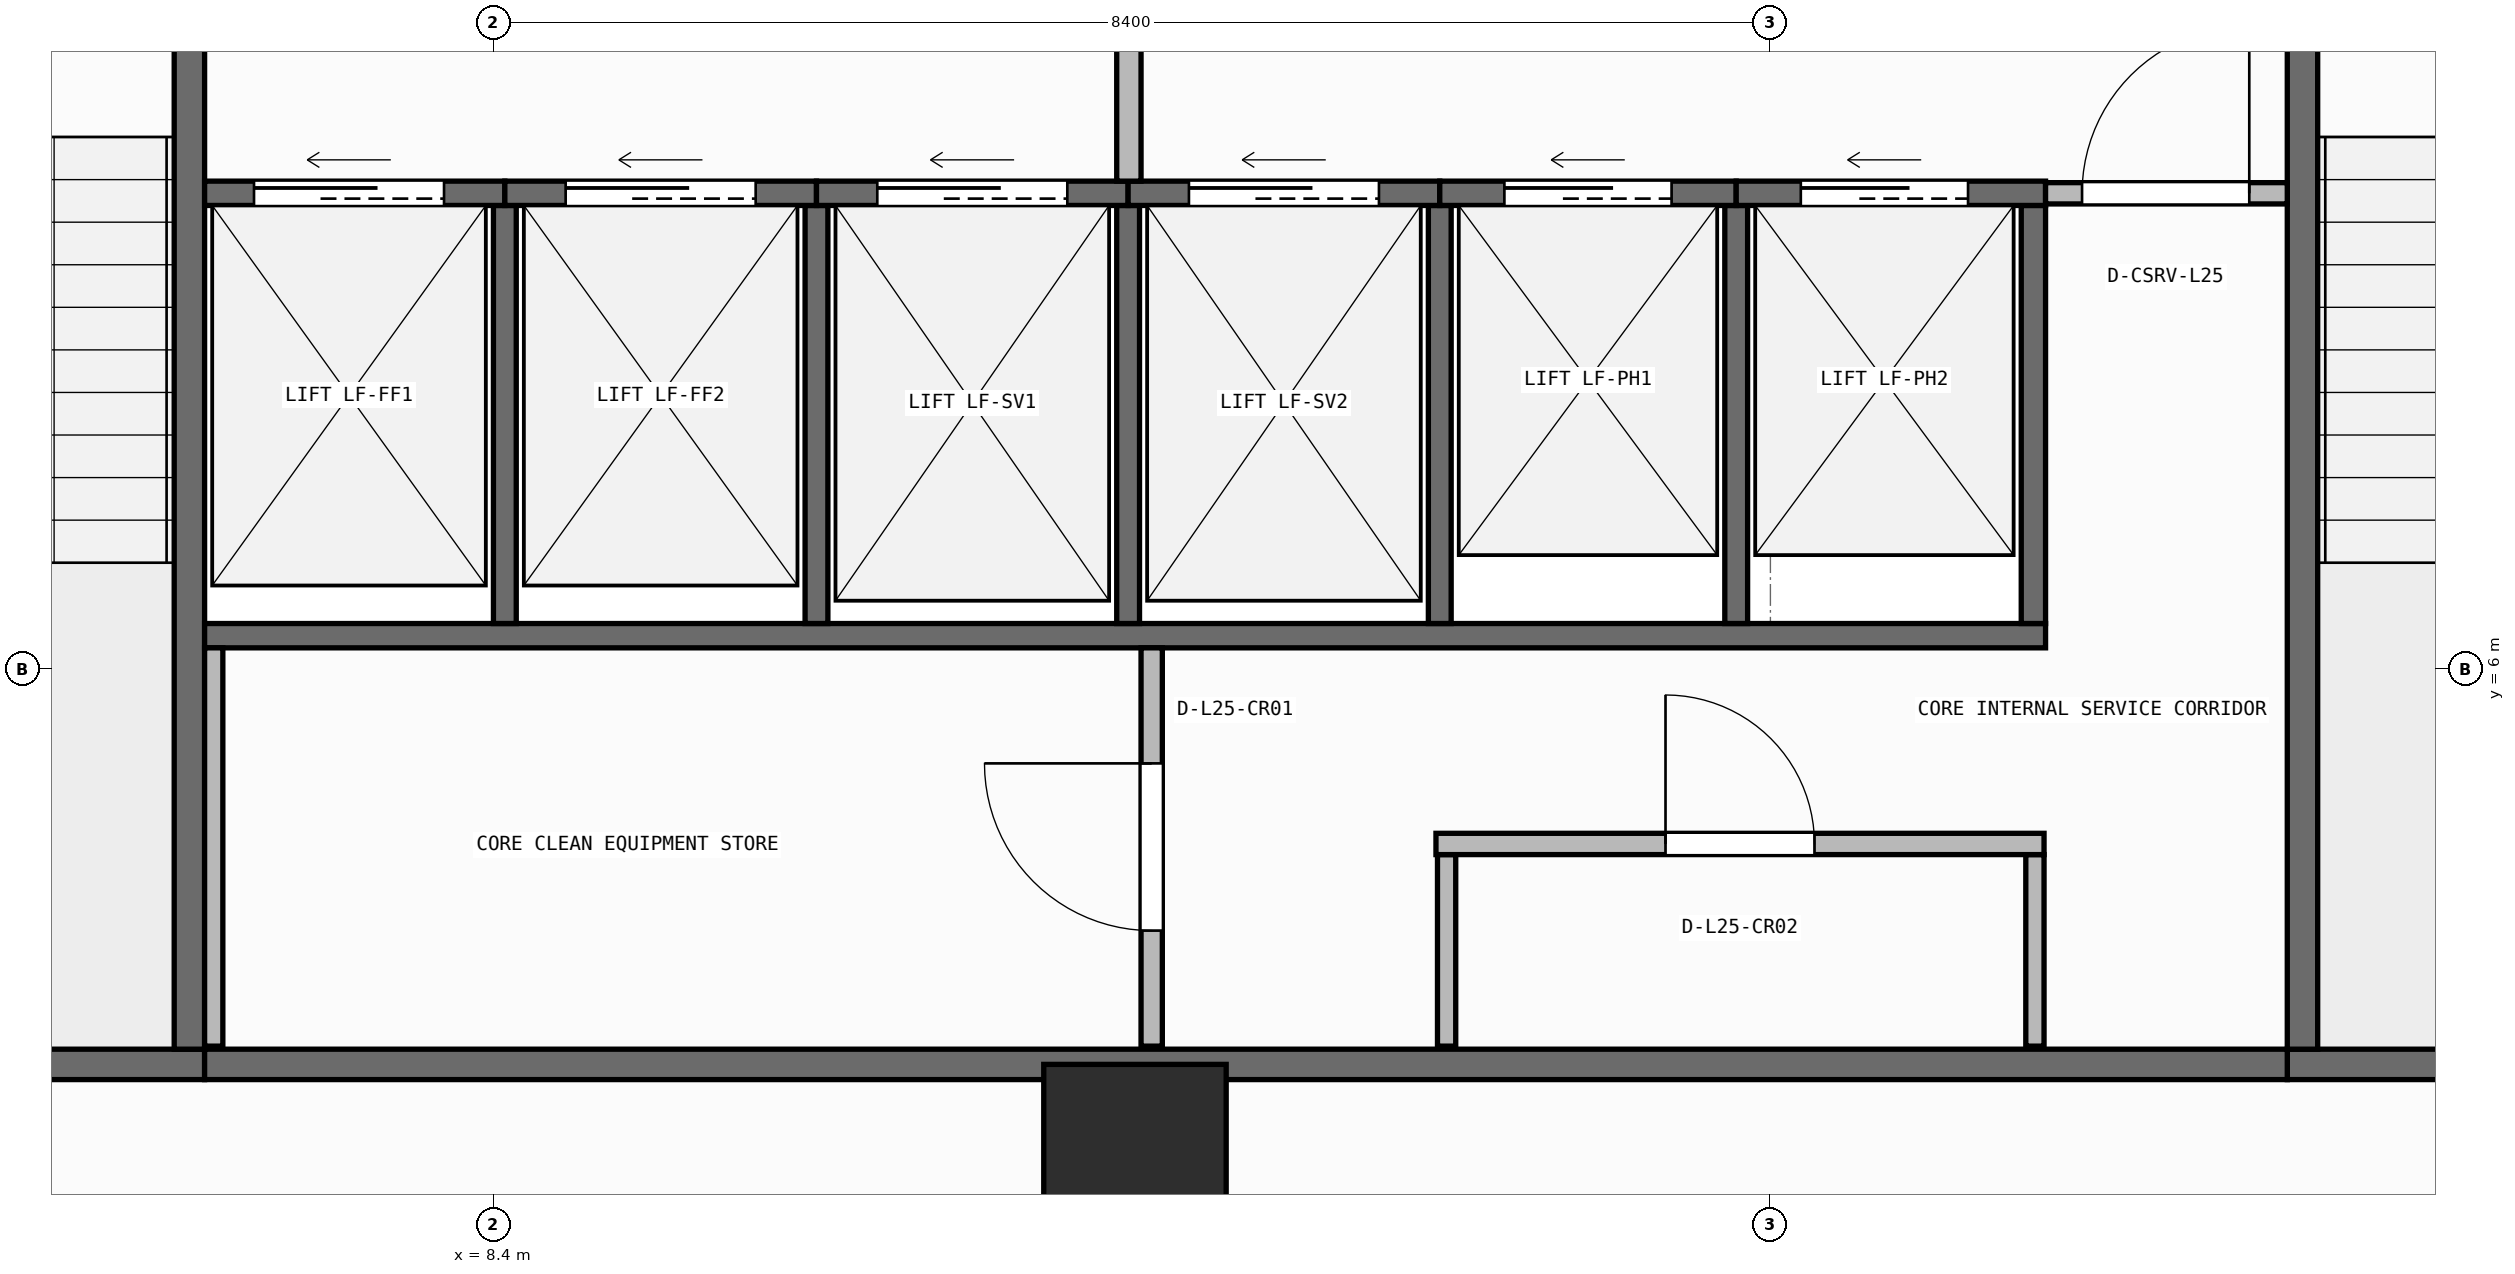
"""IFC4 building model, lengths in metres.
Left out: names, types, materials, properties, quantities, classifications, styles, units other than length and angle.
Written with IfcOpenShell. Run it as: python <this file> out.ifc"""

import sys

from ifc_helpers import new_model, si_unit, direction, frame, frame_2d, origin, origin_2d, place, context, subcontext, project, spatial, rectangle, extrude, element, fill, save


model = new_model("IFC4")
c1 = context("Model", 3, precision=1e-05, world=origin(), true_north=direction((0.0, 1.0)))
c2 = subcontext(c1, "Body", "Model", "MODEL_VIEW")
j1 = project(units=[si_unit("LENGTHUNIT", "METRE"), si_unit("PLANEANGLEUNIT", "RADIAN")], contexts=[c1])
p1 = place(None, origin())
s1 = spatial("IfcSite", under=j1, at=p1, CompositionType="ELEMENT")
p2 = place(p1, origin())
s2 = spatial("IfcBuilding", under=s1, at=p2, CompositionType="ELEMENT")
p3 = place(p2, frame((0.0, 0.0, 97.55)))
s3 = spatial("IfcBuildingStorey", under=s2, at=p3, CompositionType="ELEMENT", Elevation=97.55)
p4 = place(p3, frame((12.62, 2.8, 0.0), z_axis=(0.0, 0.0, 1.0), x_axis=(1.0, 0.0, 0.0)))
e1 = element("IfcColumn", 1, at=p4, inside=s3, PredefinedType="COLUMN", context=c2, shape_type="SweptSolid", body=[
    extrude(rectangle(XDim=1.4, YDim=1.4, at=origin_2d()), origin(), (0.0, 0.0, 1.0), 5.8),
])
p5 = place(p3, frame((2.8, 3.4, 0.0), z_axis=(0.0, 0.0, 1.0), x_axis=(1.0, 0.0, 0.0)))
e2 = element("IfcWall", 2, at=p5, inside=s3, PredefinedType="SHEAR", context=c2, shape_type="SweptSolid", body=[
    extrude(rectangle(XDim=3.7, YDim=0.2, at=frame_2d((1.85, 0.0))), origin(), (0.0, 0.0, 1.0), 5.56),
])
p6 = place(p3, frame((6.4, 3.5, 0.0), z_axis=(0.0, 0.0, 1.0), x_axis=(0.0, 1.0, 0.0)))
e3 = element("IfcWall", 3, at=p6, inside=s3, PredefinedType="SHEAR", context=c2, shape_type="SweptSolid", body=[
    extrude(rectangle(XDim=7.6, YDim=0.2, at=frame_2d((3.8, 0.0))), origin(), (0.0, 0.0, 1.0), 5.56),
])
p7 = place(p3, frame((20.2, 3.4, 0.0), z_axis=(0.0, 0.0, 1.0), x_axis=(1.0, 0.0, 0.0)))
e4 = element("IfcWall", 4, at=p7, inside=s3, PredefinedType="SHEAR", context=c2, shape_type="SweptSolid", body=[
    extrude(rectangle(XDim=3.7, YDim=0.2, at=frame_2d((1.85, 0.0))), origin(), (0.0, 0.0, 1.0), 5.56),
])
p8 = place(p3, frame((20.3, 3.5, 0.0), z_axis=(0.0, 0.0, 1.0), x_axis=(0.0, 1.0, 0.0)))
e5 = element("IfcWall", 5, at=p8, inside=s3, PredefinedType="SHEAR", context=c2, shape_type="SweptSolid", body=[
    extrude(rectangle(XDim=7.6, YDim=0.2, at=frame_2d((3.8, 0.0))), origin(), (0.0, 0.0, 1.0), 5.56),
])
p9 = place(p3, frame((6.5, 3.4, 0.0), z_axis=(0.0, 0.0, 1.0), x_axis=(1.0, 0.0, 0.0)))
e6 = element("IfcWall", 6, at=p9, inside=s3, PredefinedType="SHEAR", context=c2, shape_type="SweptSolid", body=[
    extrude(rectangle(XDim=13.7, YDim=0.2, at=frame_2d((6.85, 0.0))), origin(), (0.0, 0.0, 1.0), 5.56),
])
p10 = place(p3, frame((6.5, 6.22, 0.0), z_axis=(0.0, 0.0, 1.0), x_axis=(1.0, 0.0, 0.0)))
e7 = element("IfcWall", 7, at=p10, inside=s3, PredefinedType="SHEAR", context=c2, shape_type="SweptSolid", body=[
    extrude(rectangle(XDim=12.11, YDim=0.16, at=frame_2d((6.055, 0.0))), origin(), (0.0, 0.0, 1.0), 5.56),
])
p11 = place(p3, frame((18.53, 6.3, 0.0), z_axis=(0.0, 0.0, 1.0), x_axis=(0.0, 1.0, 0.0)))
e8 = element("IfcWall", 8, at=p11, inside=s3, PredefinedType="SHEAR", context=c2, shape_type="SweptSolid", body=[
    extrude(rectangle(XDim=2.75, YDim=0.16, at=frame_2d((1.375, 0.0))), origin(), (0.0, 0.0, 1.0), 5.56),
])
for number, where, z_axis, x_axis in (
    (9, (8.475, 6.3, 0.0), (0.0, 0.0, 1.0), (0.0, 1.0, 0.0)),
    (10, (10.525, 6.3, 0.0), (0.0, 0.0, 1.0), (0.0, 1.0, 0.0)),
    (11, (12.575, 6.3, 0.0), (0.0, 0.0, 1.0), (0.0, 1.0, 0.0)),
    (12, (14.625, 6.3, 0.0), (0.0, 0.0, 1.0), (0.0, 1.0, 0.0)),
    (13, (16.575, 6.3, 0.0), (0.0, 0.0, 1.0), (0.0, 1.0, 0.0)),
):
    element("IfcWall", number, at=place(p3, frame(where, z_axis=z_axis, x_axis=x_axis)), inside=s3, PredefinedType="SHEAR", context=c2, shape_type="SweptSolid", body=[
        extrude(rectangle(XDim=2.75, YDim=0.15, at=frame_2d((1.375, 0.0))), origin(), (0.0, 0.0, 1.0), 5.56),
    ])
p12 = place(p3, frame((6.5, 9.13, 0.0), z_axis=(0.0, 0.0, 1.0), x_axis=(1.0, 0.0, 0.0)))
e14 = element("IfcWall", 14, at=p12, inside=s3, PredefinedType="SHEAR", context=c2, shape_type="SweptSolid", body=[
    extrude(rectangle(XDim=1.975, YDim=0.16, at=frame_2d((0.988, 0.0))), origin(), (0.0, 0.0, 1.0), 5.56),
])
p13 = place(p12, frame((0.325, 0.0, 0.0)))
e15 = element("IfcOpeningElement", 15, at=p13, cuts=e14, PredefinedType="OPENING", context=c2, shape_type="SweptSolid", body=[
    extrude(rectangle(XDim=1.25, YDim=2.15, at=frame_2d((0.625, 1.075))), frame((0.0, 0.09, 0.0), z_axis=(0.0, -1.0, 0.0), x_axis=(1.0, 0.0, 0.0)), (0.0, 0.0, 1.0), 0.18),
])
p14 = place(p3, frame((8.475, 9.13, 0.0), z_axis=(0.0, 0.0, 1.0), x_axis=(1.0, 0.0, 0.0)))
e16 = element("IfcWall", 16, at=p14, inside=s3, PredefinedType="SHEAR", context=c2, shape_type="SweptSolid", body=[
    extrude(rectangle(XDim=2.05, YDim=0.16, at=frame_2d((1.025, 0.0))), origin(), (0.0, 0.0, 1.0), 5.56),
])
p15 = place(p14, frame((0.4, 0.0, 0.0)))
e17 = element("IfcOpeningElement", 17, at=p15, cuts=e16, PredefinedType="OPENING", context=c2, shape_type="SweptSolid", body=[
    extrude(rectangle(XDim=1.25, YDim=2.15, at=frame_2d((0.625, 1.075))), frame((0.0, 0.09, 0.0), z_axis=(0.0, -1.0, 0.0), x_axis=(1.0, 0.0, 0.0)), (0.0, 0.0, 1.0), 0.18),
])
p16 = place(p3, frame((10.525, 9.13, 0.0), z_axis=(0.0, 0.0, 1.0), x_axis=(1.0, 0.0, 0.0)))
e18 = element("IfcWall", 18, at=p16, inside=s3, PredefinedType="SHEAR", context=c2, shape_type="SweptSolid", body=[
    extrude(rectangle(XDim=2.05, YDim=0.16, at=frame_2d((1.025, 0.0))), origin(), (0.0, 0.0, 1.0), 5.56),
])
p17 = place(p16, frame((0.4, 0.0, 0.0)))
e19 = element("IfcOpeningElement", 19, at=p17, cuts=e18, PredefinedType="OPENING", context=c2, shape_type="SweptSolid", body=[
    extrude(rectangle(XDim=1.25, YDim=2.15, at=frame_2d((0.625, 1.075))), frame((0.0, 0.09, 0.0), z_axis=(0.0, -1.0, 0.0), x_axis=(1.0, 0.0, 0.0)), (0.0, 0.0, 1.0), 0.18),
])
p18 = place(p3, frame((12.575, 9.13, 0.0), z_axis=(0.0, 0.0, 1.0), x_axis=(1.0, 0.0, 0.0)))
e20 = element("IfcWall", 20, at=p18, inside=s3, PredefinedType="SHEAR", context=c2, shape_type="SweptSolid", body=[
    extrude(rectangle(XDim=2.05, YDim=0.16, at=frame_2d((1.025, 0.0))), origin(), (0.0, 0.0, 1.0), 5.56),
])
p19 = place(p18, frame((0.4, 0.0, 0.0)))
e21 = element("IfcOpeningElement", 21, at=p19, cuts=e20, PredefinedType="OPENING", context=c2, shape_type="SweptSolid", body=[
    extrude(rectangle(XDim=1.25, YDim=2.15, at=frame_2d((0.625, 1.075))), frame((0.0, 0.09, 0.0), z_axis=(0.0, -1.0, 0.0), x_axis=(1.0, 0.0, 0.0)), (0.0, 0.0, 1.0), 0.18),
])
p20 = place(p3, frame((14.625, 9.13, 0.0), z_axis=(0.0, 0.0, 1.0), x_axis=(1.0, 0.0, 0.0)))
e22 = element("IfcWall", 22, at=p20, inside=s3, PredefinedType="SHEAR", context=c2, shape_type="SweptSolid", body=[
    extrude(rectangle(XDim=1.95, YDim=0.16, at=frame_2d((0.975, 0.0))), origin(), (0.0, 0.0, 1.0), 5.56),
])
p21 = place(p3, frame((16.575, 9.13, 0.0), z_axis=(0.0, 0.0, 1.0), x_axis=(1.0, 0.0, 0.0)))
e23 = element("IfcWall", 23, at=p21, inside=s3, PredefinedType="SHEAR", context=c2, shape_type="SweptSolid", body=[
    extrude(rectangle(XDim=2.035, YDim=0.16, at=frame_2d((1.018, 0.0))), origin(), (0.0, 0.0, 1.0), 5.56),
])
p22 = place(p3, frame((6.56, 3.52, 0.0), z_axis=(0.0, 0.0, 1.0), x_axis=(0.0, 1.0, 0.0)))
e24 = element("IfcWall", 24, at=p22, inside=s3, PredefinedType="PARTITIONING", context=c2, shape_type="SweptSolid", body=[
    extrude(rectangle(XDim=2.62, YDim=0.12, at=frame_2d((1.31, 0.0))), origin(), (0.0, 0.0, 1.0), 5.56),
])
p23 = place(p3, frame((12.73, 3.52, 0.0), z_axis=(0.0, 0.0, 1.0), x_axis=(0.0, 1.0, 0.0)))
e25 = element("IfcWall", 25, at=p23, inside=s3, PredefinedType="PARTITIONING", context=c2, shape_type="SweptSolid", body=[
    extrude(rectangle(XDim=2.62, YDim=0.14, at=frame_2d((1.31, 0.0))), origin(), (0.0, 0.0, 1.0), 5.56),
])
p24 = place(p23, frame((0.76, 0.0, 0.0)))
e26 = element("IfcOpeningElement", 26, at=p24, cuts=e25, PredefinedType="OPENING", context=c2, shape_type="SweptSolid", body=[
    extrude(rectangle(XDim=1.1, YDim=2.1, at=frame_2d((0.55, 1.05))), frame((0.0, 0.08, 0.0), z_axis=(0.0, -1.0, 0.0), x_axis=(1.0, 0.0, 0.0)), (0.0, 0.0, 1.0), 0.16),
])
for number, where, z_axis, x_axis in (
    (27, (14.67, 3.52, 0.0), (0.0, 0.0, 1.0), (0.0, 1.0, 0.0)),
    (28, (18.54, 3.52, 0.0), (0.0, 0.0, 1.0), (0.0, 1.0, 0.0)),
):
    element("IfcWall", number, at=place(p3, frame(where, z_axis=z_axis, x_axis=x_axis)), inside=s3, PredefinedType="PARTITIONING", context=c2, shape_type="SweptSolid", body=[
        extrude(rectangle(XDim=1.26, YDim=0.12, at=frame_2d((0.63, 0.0))), origin(), (0.0, 0.0, 1.0), 5.56),
    ])
p25 = place(p3, frame((14.6, 4.85, 0.0), z_axis=(0.0, 0.0, 1.0), x_axis=(1.0, 0.0, 0.0)))
e29 = element("IfcWall", 29, at=p25, inside=s3, PredefinedType="PARTITIONING", context=c2, shape_type="SweptSolid", body=[
    extrude(rectangle(XDim=4.0, YDim=0.14, at=frame_2d((2.0, 0.0))), origin(), (0.0, 0.0, 1.0), 5.56),
])
p26 = place(p25, frame((1.51, 0.0, 0.0)))
e30 = element("IfcOpeningElement", 30, at=p26, cuts=e29, PredefinedType="OPENING", context=c2, shape_type="SweptSolid", body=[
    extrude(rectangle(XDim=0.98, YDim=2.1, at=frame_2d((0.49, 1.05))), frame((0.0, 0.08, 0.0), z_axis=(0.0, -1.0, 0.0), x_axis=(1.0, 0.0, 0.0)), (0.0, 0.0, 1.0), 0.16),
])
p27 = place(p3, frame((18.61, 9.13, 0.0), z_axis=(0.0, 0.0, 1.0), x_axis=(1.0, 0.0, 0.0)))
e31 = element("IfcWall", 31, at=p27, inside=s3, PredefinedType="PARTITIONING", context=c2, shape_type="SweptSolid", body=[
    extrude(rectangle(XDim=1.59, YDim=0.14, at=frame_2d((0.795, 0.0))), origin(), (0.0, 0.0, 1.0), 5.56),
])
p28 = place(p27, frame((0.24, 0.0, 0.0)))
e32 = element("IfcOpeningElement", 32, at=p28, cuts=e31, PredefinedType="OPENING", context=c2, shape_type="SweptSolid", body=[
    extrude(rectangle(XDim=1.1, YDim=2.1, at=frame_2d((0.55, 1.05))), frame((0.0, 0.08, 0.0), z_axis=(0.0, -1.0, 0.0), x_axis=(1.0, 0.0, 0.0)), (0.0, 0.0, 1.0), 0.16),
])
p29 = place(p3, frame((12.58, 9.21, 0.0), z_axis=(0.0, 0.0, 1.0), x_axis=(0.0, 1.0, 0.0)))
e33 = element("IfcWall", 33, at=p29, inside=s3, PredefinedType="PARTITIONING", context=c2, shape_type="SweptSolid", body=[
    extrude(rectangle(XDim=2.79, YDim=0.16, at=frame_2d((1.395, 0.0))), origin(), (0.0, 0.0, 1.0), 5.56),
])
p30 = place(p13, origin())
e34 = element("IfcDoor", 34, at=p30, inside=s3, OperationType="SLIDING_TO_LEFT", PredefinedType="DOOR", context=c2, shape_type="SweptSolid", body=[
    extrude(rectangle(XDim=1.25, YDim=2.15, at=frame_2d((0.625, 1.075))), frame((0.0, 0.025, 0.0), z_axis=(0.0, -1.0, 0.0), x_axis=(1.0, 0.0, 0.0)), (0.0, 0.0, 1.0), 0.05),
])
fill(e15, e34)
p31 = place(p15, origin())
e35 = element("IfcDoor", 35, at=p31, inside=s3, OperationType="SLIDING_TO_LEFT", PredefinedType="DOOR", context=c2, shape_type="SweptSolid", body=[
    extrude(rectangle(XDim=1.25, YDim=2.15, at=frame_2d((0.625, 1.075))), frame((0.0, 0.025, 0.0), z_axis=(0.0, -1.0, 0.0), x_axis=(1.0, 0.0, 0.0)), (0.0, 0.0, 1.0), 0.05),
])
fill(e17, e35)
p32 = place(p17, origin())
e36 = element("IfcDoor", 36, at=p32, inside=s3, OperationType="SLIDING_TO_LEFT", PredefinedType="DOOR", context=c2, shape_type="SweptSolid", body=[
    extrude(rectangle(XDim=1.25, YDim=2.15, at=frame_2d((0.625, 1.075))), frame((0.0, 0.025, 0.0), z_axis=(0.0, -1.0, 0.0), x_axis=(1.0, 0.0, 0.0)), (0.0, 0.0, 1.0), 0.05),
])
fill(e19, e36)
p33 = place(p19, origin())
e37 = element("IfcDoor", 37, at=p33, inside=s3, OperationType="SLIDING_TO_LEFT", PredefinedType="DOOR", context=c2, shape_type="SweptSolid", body=[
    extrude(rectangle(XDim=1.25, YDim=2.15, at=frame_2d((0.625, 1.075))), frame((0.0, 0.025, 0.0), z_axis=(0.0, -1.0, 0.0), x_axis=(1.0, 0.0, 0.0)), (0.0, 0.0, 1.0), 0.05),
])
fill(e21, e37)
p34 = place(p24, origin())
e38 = element("IfcDoor", 38, at=p34, inside=s3, OperationType="SINGLE_SWING_LEFT", PredefinedType="DOOR", context=c2, shape_type="SweptSolid", body=[
    extrude(rectangle(XDim=1.1, YDim=2.1, at=frame_2d((0.55, 1.05))), frame((0.0, 0.025, 0.0), z_axis=(0.0, -1.0, 0.0), x_axis=(1.0, 0.0, 0.0)), (0.0, 0.0, 1.0), 0.05),
])
fill(e26, e38)
p35 = place(p26, origin())
e39 = element("IfcDoor", 39, at=p35, inside=s3, OperationType="SINGLE_SWING_RIGHT", PredefinedType="DOOR", context=c2, shape_type="SweptSolid", body=[
    extrude(rectangle(XDim=0.98, YDim=2.1, at=frame_2d((0.49, 1.05))), frame((0.0, 0.025, 0.0), z_axis=(0.0, -1.0, 0.0), x_axis=(1.0, 0.0, 0.0)), (0.0, 0.0, 1.0), 0.05),
])
fill(e30, e39)
p36 = place(p28, origin())
e40 = element("IfcDoor", 40, at=p36, inside=s3, OperationType="SINGLE_SWING_LEFT", PredefinedType="DOOR", context=c2, shape_type="SweptSolid", body=[
    extrude(rectangle(XDim=1.1, YDim=2.1, at=frame_2d((0.55, 1.05))), frame((0.0, 0.025, 0.0), z_axis=(0.0, -1.0, 0.0), x_axis=(1.0, 0.0, 0.0)), (0.0, 0.0, 1.0), 0.05),
])
fill(e32, e40)
save(model, sys.argv[1])
